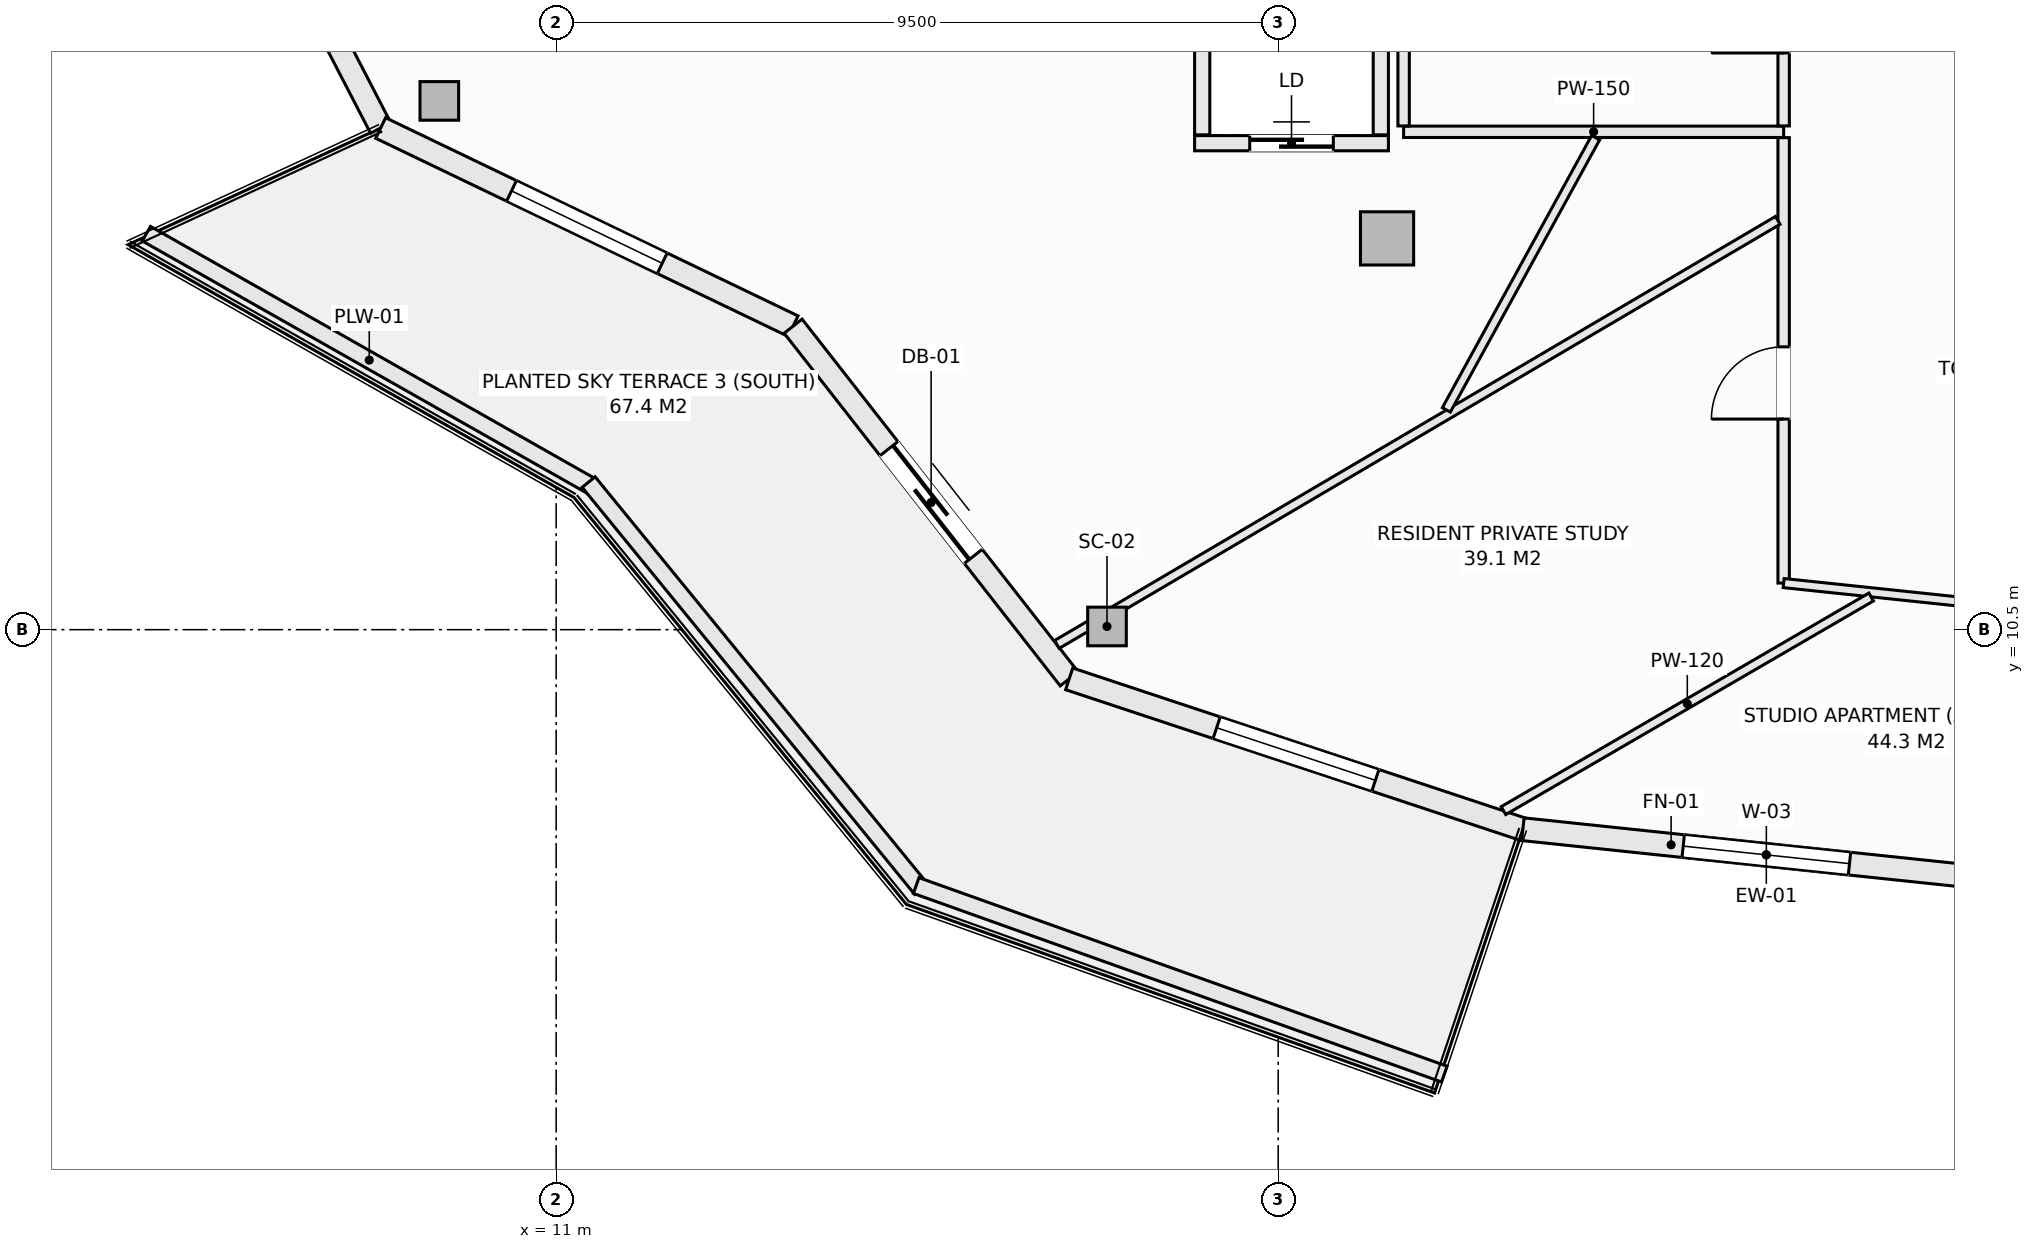
"""IFC4 building model, lengths in metres.
Left out: names, types, materials, properties, quantities, classifications, styles, units other than length and angle.
Written with IfcOpenShell. Run it as: python <this file> out.ifc"""

import sys

from ifc_helpers import new_model, si_unit, direction, frame, frame_2d, origin, origin_2d, place, context, subcontext, project, spatial, rectangle, hollow_rectangle, extrude, element, fill, save


model = new_model("IFC4")
c1 = context("Model", 3, precision=1e-05, world=origin(), true_north=direction((0.0, 1.0)))
c2 = subcontext(c1, "Body", "Model", "MODEL_VIEW")
j1 = project(units=[si_unit("LENGTHUNIT", "METRE"), si_unit("PLANEANGLEUNIT", "RADIAN")], contexts=[c1])
p1 = place(None, origin())
s1 = spatial("IfcSite", under=j1, at=p1, CompositionType="ELEMENT")
p2 = place(p1, origin())
s2 = spatial("IfcBuilding", under=s1, at=p2, CompositionType="ELEMENT")
p3 = place(p2, frame((0.0, 0.0, 199.7)))
s3 = spatial("IfcBuildingStorey", under=s2, at=p3, CompositionType="ELEMENT", Elevation=199.7)
for number, where, z_axis, x_axis in (
    (1, (9.463, 17.456, -0.27), (0.0, 0.0, 1.0), (1.0, 0.0, 0.0)),
    (2, (18.247, 10.542, -0.27), (0.0, 0.0, 1.0), (1.0, 0.0, 0.0)),
):
    element("IfcColumn", number, at=place(p3, frame(where, z_axis=z_axis, x_axis=x_axis)), inside=s3, PredefinedType="COLUMN", context=c2, shape_type="SweptSolid", body=[
        extrude(hollow_rectangle(XDim=0.508, YDim=0.508, WallThickness=0.019, at=origin_2d()), origin(), (0.0, 0.0, 1.0), 3.3),
    ])
p4 = place(p3, frame((21.932, 15.648, -0.27), z_axis=(0.0, 0.0, 1.0), x_axis=(1.0, 0.0, 0.0)))
e3 = element("IfcColumn", 3, at=p4, inside=s3, PredefinedType="COLUMN", context=c2, shape_type="SweptSolid", body=[
    extrude(rectangle(XDim=0.7, YDim=0.7, at=origin_2d()), origin(), (0.0, 0.0, 1.0), 3.3),
])
p5 = place(p3, frame((6.218, 21.875, 0.0), z_axis=(0.0, 0.0, 1.0), x_axis=(0.459808219482, -0.888018243786, 0.0)))
e4 = element("IfcWall", 4, at=p5, inside=s3, PredefinedType="SOLIDWALL", context=c2, shape_type="SweptSolid", body=[
    extrude(rectangle(XDim=5.378, YDim=0.3, at=frame_2d((2.689, 0.0))), origin(), (0.0, 0.0, 1.0), 2.605),
])
p6 = place(p5, frame((1.589, 0.0, 0.72)))
e5 = element("IfcOpeningElement", 5, at=p6, cuts=e4, PredefinedType="OPENING", context=c2, shape_type="SweptSolid", body=[
    extrude(rectangle(XDim=2.2, YDim=1.65, at=frame_2d((1.1, 0.825))), frame((0.0, 0.16, 0.0), z_axis=(0.0, -1.0, 0.0), x_axis=(1.0, 0.0, 0.0)), (0.0, 0.0, 1.0), 0.32),
])
p7 = place(p3, frame((8.691, 17.1, 0.0), z_axis=(0.0, 0.0, 1.0), x_axis=(0.901348331142, -0.433094892545, 0.0)))
e6 = element("IfcWall", 6, at=p7, inside=s3, PredefinedType="SOLIDWALL", context=c2, shape_type="SweptSolid", body=[
    extrude(rectangle(XDim=6.021, YDim=0.3, at=frame_2d((3.01, 0.0))), origin(), (0.0, 0.0, 1.0), 2.605),
])
p8 = place(p7, frame((1.91, 0.0, 0.72)))
e7 = element("IfcOpeningElement", 7, at=p8, cuts=e6, PredefinedType="OPENING", context=c2, shape_type="SweptSolid", body=[
    extrude(rectangle(XDim=2.2, YDim=1.65, at=frame_2d((1.1, 0.825))), frame((0.0, 0.16, 0.0), z_axis=(0.0, -1.0, 0.0), x_axis=(1.0, 0.0, 0.0)), (0.0, 0.0, 1.0), 0.32),
])
p9 = place(p3, frame((14.117, 14.493, 0.0), z_axis=(0.0, 0.0, 1.0), x_axis=(0.616450126935, -0.787393955401, 0.0)))
e8 = element("IfcWall", 8, at=p9, inside=s3, PredefinedType="SOLIDWALL", context=c2, shape_type="SweptSolid", body=[
    extrude(rectangle(XDim=5.893, YDim=0.3, at=frame_2d((2.946, 0.0))), origin(), (0.0, 0.0, 1.0), 2.605),
])
p10 = place(p9, frame((2.046, 0.0, 0.0)))
e9 = element("IfcOpeningElement", 9, at=p10, cuts=e8, PredefinedType="OPENING", context=c2, shape_type="SweptSolid", body=[
    extrude(rectangle(XDim=1.8, YDim=2.25, at=frame_2d((0.9, 1.125))), frame((0.0, 0.16, 0.0), z_axis=(0.0, -1.0, 0.0), x_axis=(1.0, 0.0, 0.0)), (0.0, 0.0, 1.0), 0.32),
])
p11 = place(p3, frame((17.75, 9.853, 0.0), z_axis=(0.0, 0.0, 1.0), x_axis=(0.949240877604, -0.314550085495, 0.0)))
e10 = element("IfcWall", 10, at=p11, inside=s3, PredefinedType="SOLIDWALL", context=c2, shape_type="SweptSolid", body=[
    extrude(rectangle(XDim=6.288, YDim=0.3, at=frame_2d((3.144, 0.0))), origin(), (0.0, 0.0, 1.0), 2.605),
])
p12 = place(p11, frame((2.044, 0.0, 0.72)))
e11 = element("IfcOpeningElement", 11, at=p12, cuts=e10, PredefinedType="OPENING", context=c2, shape_type="SweptSolid", body=[
    extrude(rectangle(XDim=2.2, YDim=1.65, at=frame_2d((1.1, 0.825))), frame((0.0, 0.16, 0.0), z_axis=(0.0, -1.0, 0.0), x_axis=(1.0, 0.0, 0.0)), (0.0, 0.0, 1.0), 0.32),
])
p13 = place(p3, frame((23.719, 7.875, 0.0), z_axis=(0.0, 0.0, 1.0), x_axis=(0.994497142298, -0.104763705363, 0.0)))
e12 = element("IfcWall", 12, at=p13, inside=s3, PredefinedType="SOLIDWALL", context=c2, shape_type="SweptSolid", body=[
    extrude(rectangle(XDim=6.441, YDim=0.3, at=frame_2d((3.221, 0.0))), origin(), (0.0, 0.0, 1.0), 2.605),
])
p14 = place(p13, frame((2.121, 0.0, 0.72)))
e13 = element("IfcOpeningElement", 13, at=p14, cuts=e12, PredefinedType="OPENING", context=c2, shape_type="SweptSolid", body=[
    extrude(rectangle(XDim=2.2, YDim=1.65, at=frame_2d((1.1, 0.825))), frame((0.0, 0.16, 0.0), z_axis=(0.0, -1.0, 0.0), x_axis=(1.0, 0.0, 0.0)), (0.0, 0.0, 1.0), 0.32),
])
p15 = place(p3, frame((5.608, 15.709, 0.0), z_axis=(0.0, 0.0, 1.0), x_axis=(0.869860619267, -0.493297580623, 0.0)))
e14 = element("IfcWall", 14, at=p15, inside=s3, PredefinedType="PARAPET", context=c2, shape_type="SweptSolid", body=[
    extrude(rectangle(XDim=6.743, YDim=0.22, at=frame_2d((3.371, 0.0))), origin(), (0.0, 0.0, 1.0), 0.52),
])
p16 = place(p3, frame((11.427, 12.441, 0.0), z_axis=(0.0, 0.0, 1.0), x_axis=(0.632697312147, -0.774399193699, 0.0)))
e15 = element("IfcWall", 15, at=p16, inside=s3, PredefinedType="PARAPET", context=c2, shape_type="SweptSolid", body=[
    extrude(rectangle(XDim=6.914, YDim=0.22, at=frame_2d((3.457, 0.0))), origin(), (0.0, 0.0, 1.0), 0.52),
])
p17 = place(p3, frame((15.737, 7.134, 0.0), z_axis=(0.0, 0.0, 1.0), x_axis=(0.941780086523, -0.336229488042, 0.0)))
e16 = element("IfcWall", 16, at=p17, inside=s3, PredefinedType="PARAPET", context=c2, shape_type="SweptSolid", body=[
    extrude(rectangle(XDim=7.378, YDim=0.22, at=frame_2d((3.689, 0.0))), origin(), (0.0, 0.0, 1.0), 0.52),
])
p18 = place(p3, frame((19.4, 16.9, 0.0), z_axis=(0.0, 0.0, 1.0), x_axis=(1.0, 0.0, 0.0)))
e17 = element("IfcWall", 17, at=p18, inside=s3, PredefinedType="SOLIDWALL", context=c2, shape_type="SweptSolid", body=[
    extrude(rectangle(XDim=2.55, YDim=0.2, at=frame_2d((1.275, 0.0))), origin(), (0.0, 0.0, 1.0), 3.03),
])
p19 = place(p18, frame((0.725, 0.0, 0.0)))
e18 = element("IfcOpeningElement", 18, at=p19, cuts=e17, PredefinedType="OPENING", context=c2, shape_type="SweptSolid", body=[
    extrude(rectangle(XDim=1.1, YDim=2.2, at=frame_2d((0.55, 1.1))), frame((0.0, 0.11, 0.0), z_axis=(0.0, -1.0, 0.0), x_axis=(1.0, 0.0, 0.0)), (0.0, 0.0, 1.0), 0.22),
])
for number, where, z_axis, x_axis in (
    (19, (19.5, 17.01, 0.0), (0.0, 0.0, 1.0), (0.0, 1.0, 0.0)),
    (20, (21.85, 17.01, 0.0), (0.0, 0.0, 1.0), (0.0, 1.0, 0.0)),
):
    element("IfcWall", number, at=place(p3, frame(where, z_axis=z_axis, x_axis=x_axis)), inside=s3, PredefinedType="SOLIDWALL", context=c2, shape_type="SweptSolid", body=[
        extrude(rectangle(XDim=2.53, YDim=0.2, at=frame_2d((1.265, 0.0))), origin(), (0.0, 0.0, 1.0), 3.03),
    ])
p20 = place(p3, frame((22.15, 17.05, 0.0), z_axis=(0.0, 0.0, 1.0), x_axis=(1.0, 0.0, 0.0)))
e21 = element("IfcWall", 21, at=p20, inside=s3, PredefinedType="PARTITIONING", context=c2, shape_type="SweptSolid", body=[
    extrude(rectangle(XDim=5.0, YDim=0.15, at=frame_2d((2.5, 0.0))), origin(), (0.0, 0.0, 1.0), 3.03),
])
p21 = place(p3, frame((22.15, 17.127, 0.0), z_axis=(0.0, 0.0, 1.0), x_axis=(0.0, 1.0, 0.0)))
e22 = element("IfcWall", 22, at=p21, inside=s3, PredefinedType="PARTITIONING", context=c2, shape_type="SweptSolid", body=[
    extrude(rectangle(XDim=2.823, YDim=0.15, at=frame_2d((1.412, 0.0))), origin(), (0.0, 0.0, 1.0), 3.03),
])
p22 = place(p3, frame((27.15, 11.113, 0.0), z_axis=(0.0, 0.0, 1.0), x_axis=(0.0, 1.0, 0.0)))
e23 = element("IfcWall", 23, at=p22, inside=s3, PredefinedType="PARTITIONING", context=c2, shape_type="SweptSolid", body=[
    extrude(rectangle(XDim=5.86, YDim=0.15, at=frame_2d((2.93, 0.0))), origin(), (0.0, 0.0, 1.0), 3.03),
])
p23 = place(p22, frame((2.158, 0.0, 0.0)))
e24 = element("IfcOpeningElement", 24, at=p23, cuts=e23, PredefinedType="OPENING", context=c2, shape_type="SweptSolid", body=[
    extrude(rectangle(XDim=0.95, YDim=2.1, at=frame_2d((0.475, 1.05))), frame((0.0, 0.085, 0.0), z_axis=(0.0, -1.0, 0.0), x_axis=(1.0, 0.0, 0.0)), (0.0, 0.0, 1.0), 0.17),
])
p24 = place(p3, frame((27.15, 17.127, 0.0), z_axis=(0.0, 0.0, 1.0), x_axis=(0.0, 1.0, 0.0)))
e25 = element("IfcWall", 25, at=p24, inside=s3, PredefinedType="PARTITIONING", context=c2, shape_type="SweptSolid", body=[
    extrude(rectangle(XDim=2.871, YDim=0.15, at=frame_2d((1.436, 0.0))), origin(), (0.0, 0.0, 1.0), 3.03),
])
p25 = place(p24, frame((0.96, 0.0, 0.0)))
e26 = element("IfcOpeningElement", 26, at=p25, cuts=e25, PredefinedType="OPENING", context=c2, shape_type="SweptSolid", body=[
    extrude(rectangle(XDim=0.95, YDim=2.1, at=frame_2d((0.475, 1.05))), frame((0.0, 0.085, 0.0), z_axis=(0.0, -1.0, 0.0), x_axis=(1.0, 0.0, 0.0)), (0.0, 0.0, 1.0), 0.17),
])
p26 = place(p3, frame((27.15, 11.113, 0.0), z_axis=(0.0, 0.0, 1.0), x_axis=(0.994493127971, -0.104801805413, 0.0)))
e27 = element("IfcWall", 27, at=p26, inside=s3, PredefinedType="PARTITIONING", context=c2, shape_type="SweptSolid", body=[
    extrude(rectangle(XDim=2.281, YDim=0.12, at=frame_2d((1.14, 0.0))), origin(), (0.0, 0.0, 1.0), 3.03),
])
p27 = place(p3, frame((17.588, 10.306, 0.0), z_axis=(0.0, 0.0, 1.0), x_axis=(0.861937637277, 0.507014308915, 0.0)))
e28 = element("IfcWall", 28, at=p27, inside=s3, PredefinedType="PARTITIONING", context=c2, shape_type="SweptSolid", body=[
    extrude(rectangle(XDim=11.004, YDim=0.12, at=frame_2d((5.502, 0.0))), origin(), (0.0, 0.0, 1.0), 2.478),
])
p28 = place(p3, frame((23.464, 8.119, 0.0), z_axis=(0.0, 0.0, 1.0), x_axis=(0.86472230767, 0.502250266917, 0.0)))
e29 = element("IfcWall", 29, at=p28, inside=s3, PredefinedType="PARTITIONING", context=c2, shape_type="SweptSolid", body=[
    extrude(rectangle(XDim=5.594, YDim=0.12, at=frame_2d((2.797, 0.0))), origin(), (0.0, 0.0, 1.0), 3.03),
])
p29 = place(p3, frame((22.712, 13.392, 0.0), z_axis=(0.0, 0.0, 1.0), x_axis=(0.480957116097, 0.876744120297, 0.0)))
e30 = element("IfcWall", 30, at=p29, inside=s3, PredefinedType="PARTITIONING", context=c2, shape_type="SweptSolid", body=[
    extrude(rectangle(XDim=4.085, YDim=0.12, at=frame_2d((2.042, 0.0))), origin(), (0.0, 0.0, 1.0), 3.03),
])
p30 = place(p8, origin())
e31 = element("IfcWindow", 31, at=p30, inside=s3, PartitioningType="SINGLE_PANEL", PredefinedType="WINDOW", context=c2, shape_type="SweptSolid", body=[
    extrude(rectangle(XDim=2.2, YDim=1.65, at=frame_2d((1.1, 0.825))), frame((0.0, 0.03, 0.0), z_axis=(0.0, -1.0, 0.0), x_axis=(1.0, 0.0, 0.0)), (0.0, 0.0, 1.0), 0.06),
])
fill(e7, e31)
p31 = place(p10, frame((1.8, 0.0, 0.0), z_axis=(0.0, 0.0, 1.0), x_axis=(-1.0, 0.0, 0.0)))
e32 = element("IfcDoor", 32, at=p31, inside=s3, OperationType="SLIDING_TO_LEFT", PredefinedType="DOOR", context=c2, shape_type="SweptSolid", body=[
    extrude(rectangle(XDim=1.8, YDim=2.25, at=frame_2d((0.9, 1.125))), frame((0.0, 0.025, 0.0), z_axis=(0.0, -1.0, 0.0), x_axis=(1.0, 0.0, 0.0)), (0.0, 0.0, 1.0), 0.05),
])
fill(e9, e32)
p32 = place(p12, origin())
e33 = element("IfcWindow", 33, at=p32, inside=s3, PartitioningType="SINGLE_PANEL", PredefinedType="WINDOW", context=c2, shape_type="SweptSolid", body=[
    extrude(rectangle(XDim=2.2, YDim=1.65, at=frame_2d((1.1, 0.825))), frame((0.0, 0.03, 0.0), z_axis=(0.0, -1.0, 0.0), x_axis=(1.0, 0.0, 0.0)), (0.0, 0.0, 1.0), 0.06),
])
fill(e11, e33)
p33 = place(p14, origin())
e34 = element("IfcWindow", 34, at=p33, inside=s3, PartitioningType="SINGLE_PANEL", PredefinedType="WINDOW", context=c2, shape_type="SweptSolid", body=[
    extrude(rectangle(XDim=2.2, YDim=1.65, at=frame_2d((1.1, 0.825))), frame((0.0, 0.03, 0.0), z_axis=(0.0, -1.0, 0.0), x_axis=(1.0, 0.0, 0.0)), (0.0, 0.0, 1.0), 0.06),
])
fill(e13, e34)
p34 = place(p19, origin())
e35 = element("IfcDoor", 35, at=p34, inside=s3, OperationType="SLIDING_TO_LEFT", PredefinedType="DOOR", context=c2, shape_type="SweptSolid", body=[
    extrude(rectangle(XDim=1.1, YDim=2.2, at=frame_2d((0.55, 1.1))), frame((0.0, 0.025, 0.0), z_axis=(0.0, -1.0, 0.0), x_axis=(1.0, 0.0, 0.0)), (0.0, 0.0, 1.0), 0.05),
])
fill(e18, e35)
p35 = place(p25, origin())
e36 = element("IfcDoor", 36, at=p35, inside=s3, OperationType="SINGLE_SWING_LEFT", PredefinedType="DOOR", context=c2, shape_type="SweptSolid", body=[
    extrude(rectangle(XDim=0.95, YDim=2.1, at=frame_2d((0.475, 1.05))), frame((0.0, 0.025, 0.0), z_axis=(0.0, -1.0, 0.0), x_axis=(1.0, 0.0, 0.0)), (0.0, 0.0, 1.0), 0.05),
])
fill(e26, e36)
p36 = place(p23, origin())
e37 = element("IfcDoor", 37, at=p36, inside=s3, OperationType="SINGLE_SWING_LEFT", PredefinedType="DOOR", context=c2, shape_type="SweptSolid", body=[
    extrude(rectangle(XDim=0.95, YDim=2.1, at=frame_2d((0.475, 1.05))), frame((0.0, 0.025, 0.0), z_axis=(0.0, -1.0, 0.0), x_axis=(1.0, 0.0, 0.0)), (0.0, 0.0, 1.0), 0.05),
])
fill(e24, e37)
save(model, sys.argv[1])
